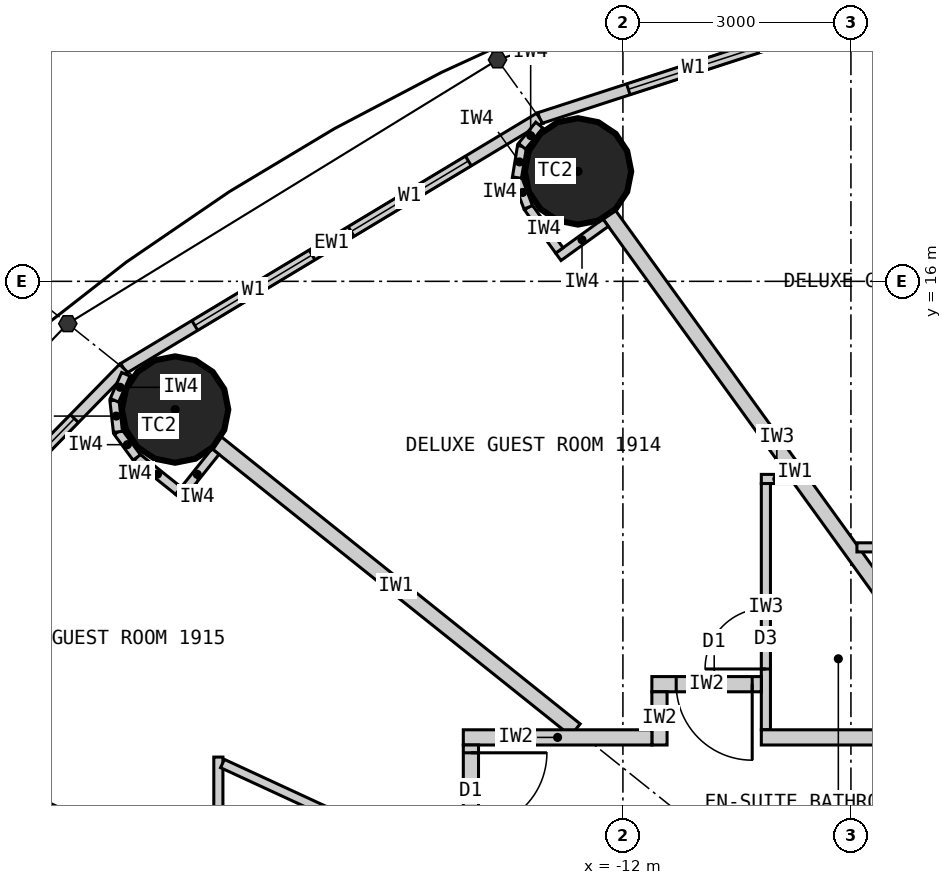
"""IFC4 building model, lengths in metres.
Left out: names, types, materials, properties, quantities, classifications, styles, units other than length and angle.
Written with IfcOpenShell. Run it as: python <this file> out.ifc"""

import sys

from ifc_helpers import new_model, si_unit, direction, frame, frame_2d, origin, origin_2d, place, context, subcontext, project, spatial, rectangle, circle, extrude, element, fill, save


model = new_model("IFC4")
c1 = context("Model", 3, precision=1e-05, world=origin(), true_north=direction((0.0, 1.0)))
c2 = subcontext(c1, "Body", "Model", "MODEL_VIEW")
j1 = project(units=[si_unit("LENGTHUNIT", "METRE"), si_unit("PLANEANGLEUNIT", "RADIAN")], contexts=[c1])
p1 = place(None, origin())
s1 = spatial("IfcSite", under=j1, at=p1, CompositionType="ELEMENT")
p2 = place(p1, origin())
s2 = spatial("IfcBuilding", under=s1, at=p2, CompositionType="ELEMENT")
p3 = place(p2, frame((0.0, 0.0, 77.1)))
s3 = spatial("IfcBuildingStorey", under=s2, at=p3, CompositionType="ELEMENT", Elevation=77.1)
for number, where, z_axis, x_axis in (
    (1, (-12.591, 17.447, 0.0), (0.0, 0.0, 1.0), (1.0, 0.0, 0.0)),
    (2, (-17.892, 14.313, 0.0), (0.0, 0.0, 1.0), (1.0, 0.0, 0.0)),
):
    element("IfcColumn", number, at=place(p3, frame(where, z_axis=z_axis, x_axis=x_axis)), inside=s3, PredefinedType="COLUMN", context=c2, shape_type="SweptSolid", body=[
        extrude(circle(Radius=0.7, at=origin_2d()), origin(), (0.0, 0.0, 1.0), 3.3),
    ])
p4 = place(p3, frame((-6.766, 20.202, 0.0), z_axis=(0.0, 0.0, 1.0), x_axis=(-0.951137534625, -0.308767534285, 0.0)))
e3 = element("IfcWall", 3, at=p4, inside=s3, PredefinedType="ELEMENTEDWALL", context=c2, shape_type="SweptSolid", body=[
    extrude(rectangle(XDim=6.655, YDim=0.15, at=frame_2d((3.328, 0.0))), origin(), (0.0, 0.0, 1.0), 3.12),
])
p5 = place(p4, frame((1.228, 0.0, 0.9)))
e4 = element("IfcOpeningElement", 4, at=p5, cuts=e3, PredefinedType="OPENING", context=c2, shape_type="SweptSolid", body=[
    extrude(rectangle(XDim=1.8, YDim=1.9, at=frame_2d((0.9, 0.95))), frame((0.0, 0.085, 0.0), z_axis=(0.0, -1.0, 0.0), x_axis=(1.0, 0.0, 0.0)), (0.0, 0.0, 1.0), 0.17),
])
p6 = place(p4, frame((3.628, 0.0, 0.9)))
e5 = element("IfcOpeningElement", 5, at=p6, cuts=e3, PredefinedType="OPENING", context=c2, shape_type="SweptSolid", body=[
    extrude(rectangle(XDim=1.8, YDim=1.9, at=frame_2d((0.9, 0.95))), frame((0.0, 0.085, 0.0), z_axis=(0.0, -1.0, 0.0), x_axis=(1.0, 0.0, 0.0)), (0.0, 0.0, 1.0), 0.17),
])
p7 = place(p3, frame((-13.096, 18.147, 0.0), z_axis=(0.0, 0.0, 1.0), x_axis=(-0.856983180864, -0.515344377787, 0.0)))
e6 = element("IfcWall", 6, at=p7, inside=s3, PredefinedType="ELEMENTEDWALL", context=c2, shape_type="SweptSolid", body=[
    extrude(rectangle(XDim=6.386, YDim=0.15, at=frame_2d((3.193, 0.0))), origin(), (0.0, 0.0, 1.0), 3.12),
])
p8 = place(p7, frame((1.093, 0.0, 0.9)))
e7 = element("IfcOpeningElement", 7, at=p8, cuts=e6, PredefinedType="OPENING", context=c2, shape_type="SweptSolid", body=[
    extrude(rectangle(XDim=1.8, YDim=1.9, at=frame_2d((0.9, 0.95))), frame((0.0, 0.085, 0.0), z_axis=(0.0, -1.0, 0.0), x_axis=(1.0, 0.0, 0.0)), (0.0, 0.0, 1.0), 0.17),
])
p9 = place(p7, frame((3.493, 0.0, 0.9)))
e8 = element("IfcOpeningElement", 8, at=p9, cuts=e6, PredefinedType="OPENING", context=c2, shape_type="SweptSolid", body=[
    extrude(rectangle(XDim=1.8, YDim=1.9, at=frame_2d((0.9, 0.95))), frame((0.0, 0.085, 0.0), z_axis=(0.0, -1.0, 0.0), x_axis=(1.0, 0.0, 0.0)), (0.0, 0.0, 1.0), 0.17),
])
p10 = place(p3, frame((-18.57, 14.856, 0.0), z_axis=(0.0, 0.0, 1.0), x_axis=(-0.699602905915, -0.714531856557, 0.0)))
e9 = element("IfcWall", 9, at=p10, inside=s3, PredefinedType="ELEMENTEDWALL", context=c2, shape_type="SweptSolid", body=[
    extrude(rectangle(XDim=6.051, YDim=0.15, at=frame_2d((3.025, 0.0))), origin(), (0.0, 0.0, 1.0), 3.12),
])
p11 = place(p10, frame((0.926, 0.0, 0.9)))
e10 = element("IfcOpeningElement", 10, at=p11, cuts=e9, PredefinedType="OPENING", context=c2, shape_type="SweptSolid", body=[
    extrude(rectangle(XDim=1.8, YDim=1.9, at=frame_2d((0.9, 0.95))), frame((0.0, 0.085, 0.0), z_axis=(0.0, -1.0, 0.0), x_axis=(1.0, 0.0, 0.0)), (0.0, 0.0, 1.0), 0.17),
])
p12 = place(p10, frame((3.325, 0.0, 0.9)))
e11 = element("IfcOpeningElement", 11, at=p12, cuts=e9, PredefinedType="OPENING", context=c2, shape_type="SweptSolid", body=[
    extrude(rectangle(XDim=1.8, YDim=1.9, at=frame_2d((0.9, 0.95))), frame((0.0, 0.085, 0.0), z_axis=(0.0, -1.0, 0.0), x_axis=(1.0, 0.0, 0.0)), (0.0, 0.0, 1.0), 0.17),
])
p13 = place(p3, frame((-7.289, 10.1, 0.0), z_axis=(0.0, 0.0, 1.0), x_axis=(-0.585198353053, 0.810890182197, 0.0)))
e12 = element("IfcWall", 12, at=p13, inside=s3, PredefinedType="PARTITIONING", context=c2, shape_type="SweptSolid", body=[
    extrude(rectangle(XDim=8.36, YDim=0.2, at=frame_2d((4.18, 0.0))), origin(), (0.0, 0.0, 1.0), 2.32),
])
p14 = place(p3, frame((-12.625, 10.1, 0.0), z_axis=(0.0, 0.0, 1.0), x_axis=(-0.780892451574, 0.624665493744, 0.0)))
e13 = element("IfcWall", 13, at=p14, inside=s3, PredefinedType="PARTITIONING", context=c2, shape_type="SweptSolid", body=[
    extrude(rectangle(XDim=6.045, YDim=0.2, at=frame_2d((3.022, 0.0))), origin(), (0.0, 0.0, 1.0), 2.32),
])
p15 = place(p3, frame((-14.1, 6.512, 0.0), z_axis=(0.0, 0.0, 1.0), x_axis=(-0.907832871056, 0.419332181247, 0.0)))
e14 = element("IfcWall", 14, at=p15, inside=s3, PredefinedType="PARTITIONING", context=c2, shape_type="SweptSolid", body=[
    extrude(rectangle(XDim=8.023, YDim=0.2, at=frame_2d((4.011, 0.0))), origin(), (0.0, 0.0, 1.0), 2.32),
])
p16 = place(p3, frame((-8.921, 12.5, 0.0), z_axis=(0.0, 0.0, 1.0), x_axis=(1.0, 0.0, 0.0)))
e15 = element("IfcWall", 15, at=p16, inside=s3, PredefinedType="PARTITIONING", context=c2, shape_type="SweptSolid", body=[
    extrude(rectangle(XDim=3.372, YDim=0.12, at=frame_2d((1.686, 0.0))), origin(), (0.0, 0.0, 1.0), 3.12),
])
p17 = place(p3, frame((-9.771, 13.4, 0.0), z_axis=(0.0, 0.0, 1.0), x_axis=(-1.0, 0.0, 0.0)))
e16 = element("IfcWall", 16, at=p17, inside=s3, PredefinedType="PARTITIONING", context=c2, shape_type="SweptSolid", body=[
    extrude(rectangle(XDim=0.408, YDim=0.12, at=frame_2d((0.204, 0.0))), origin(), (0.0, 0.0, 1.0), 3.12),
])
p18 = place(p3, frame((-10.119, 10.1, 0.0), z_axis=(0.0, 0.0, 1.0), x_axis=(0.0, 1.0, 0.0)))
e17 = element("IfcWall", 17, at=p18, inside=s3, PredefinedType="PARTITIONING", context=c2, shape_type="SweptSolid", body=[
    extrude(rectangle(XDim=3.24, YDim=0.12, at=frame_2d((1.62, 0.0))), origin(), (0.0, 0.0, 1.0), 3.12),
])
p19 = place(p18, frame((0.8, 0.0, 0.0)))
e18 = element("IfcOpeningElement", 18, at=p19, cuts=e17, PredefinedType="OPENING", context=c2, shape_type="SweptSolid", body=[
    extrude(rectangle(XDim=0.8, YDim=2.1, at=frame_2d((0.4, 1.05))), frame((0.0, 0.07, 0.0), z_axis=(0.0, -1.0, 0.0), x_axis=(1.0, 0.0, 0.0)), (0.0, 0.0, 1.0), 0.14),
])
p20 = place(p3, frame((-17.323, 8.101, 0.0), z_axis=(0.0, 0.0, 1.0), x_axis=(0.0, 1.0, 0.0)))
e19 = element("IfcWall", 19, at=p20, inside=s3, PredefinedType="PARTITIONING", context=c2, shape_type="SweptSolid", body=[
    extrude(rectangle(XDim=1.64, YDim=0.12, at=frame_2d((0.82, 0.0))), origin(), (0.0, 0.0, 1.0), 3.12),
])
p21 = place(p3, frame((-14.1, 8.193, 0.0), z_axis=(0.0, 0.0, 1.0), x_axis=(-0.907836493557, 0.419324338628, 0.0)))
e20 = element("IfcWall", 20, at=p21, inside=s3, PredefinedType="PARTITIONING", context=c2, shape_type="SweptSolid", body=[
    extrude(rectangle(XDim=3.49, YDim=0.12, at=frame_2d((1.745, 0.0))), origin(), (0.0, 0.0, 1.0), 3.12),
])
p22 = place(p21, frame((0.75, 0.0, 0.0)))
e21 = element("IfcOpeningElement", 21, at=p22, cuts=e20, PredefinedType="OPENING", context=c2, shape_type="SweptSolid", body=[
    extrude(rectangle(XDim=0.8, YDim=2.1, at=frame_2d((0.4, 1.05))), frame((0.0, 0.07, 0.0), z_axis=(0.0, -1.0, 0.0), x_axis=(1.0, 0.0, 0.0)), (0.0, 0.0, 1.0), 0.14),
])
p23 = place(p3, frame((-11.619, 10.7, 0.0), z_axis=(0.0, 0.0, 1.0), x_axis=(1.0, 0.0, 0.0)))
e22 = element("IfcWall", 22, at=p23, inside=s3, PredefinedType="PARTITIONING", context=c2, shape_type="SweptSolid", body=[
    extrude(rectangle(XDim=1.44, YDim=0.2, at=frame_2d((0.72, 0.0))), origin(), (0.0, 0.0, 1.0), 3.12),
])
p24 = place(p23, frame((0.32, 0.0, 0.0)))
e23 = element("IfcOpeningElement", 23, at=p24, cuts=e22, PredefinedType="OPENING", context=c2, shape_type="SweptSolid", body=[
    extrude(rectangle(XDim=1.0, YDim=2.2, at=frame_2d((0.5, 1.1))), frame((0.0, 0.11, 0.0), z_axis=(0.0, -1.0, 0.0), x_axis=(1.0, 0.0, 0.0)), (0.0, 0.0, 1.0), 0.22),
])
p25 = place(p3, frame((-11.519, 9.9, 0.0), z_axis=(0.0, 0.0, 1.0), x_axis=(0.0, 1.0, 0.0)))
e24 = element("IfcWall", 24, at=p25, inside=s3, PredefinedType="PARTITIONING", context=c2, shape_type="SweptSolid", body=[
    extrude(rectangle(XDim=0.7, YDim=0.2, at=frame_2d((0.35, 0.0))), origin(), (0.0, 0.0, 1.0), 3.12),
])
p26 = place(p3, frame((-14.1, 10.0, 0.0), z_axis=(0.0, 0.0, 1.0), x_axis=(1.0, 0.0, 0.0)))
e25 = element("IfcWall", 25, at=p26, inside=s3, PredefinedType="PARTITIONING", context=c2, shape_type="SweptSolid", body=[
    extrude(rectangle(XDim=2.481, YDim=0.2, at=frame_2d((1.24, 0.0))), origin(), (0.0, 0.0, 1.0), 3.12),
])
p27 = place(p3, frame((-10.179, 10.0, 0.0), z_axis=(0.0, 0.0, 1.0), x_axis=(1.0, 0.0, 0.0)))
e26 = element("IfcWall", 26, at=p27, inside=s3, PredefinedType="PARTITIONING", context=c2, shape_type="SweptSolid", body=[
    extrude(rectangle(XDim=4.63, YDim=0.2, at=frame_2d((2.315, 0.0))), origin(), (0.0, 0.0, 1.0), 3.12),
])
p28 = place(p3, frame((-14.0, 9.9, 0.0), z_axis=(0.0, 0.0, 1.0), x_axis=(0.0, -1.0, 0.0)))
e27 = element("IfcWall", 27, at=p28, inside=s3, PredefinedType="PARTITIONING", context=c2, shape_type="SweptSolid", body=[
    extrude(rectangle(XDim=5.127, YDim=0.2, at=frame_2d((2.564, 0.0))), origin(), (0.0, 0.0, 1.0), 3.12),
])
p29 = place(p28, frame((0.103, 0.0, 0.0)))
e28 = element("IfcOpeningElement", 28, at=p29, cuts=e27, PredefinedType="OPENING", context=c2, shape_type="SweptSolid", body=[
    extrude(rectangle(XDim=1.0, YDim=2.2, at=frame_2d((0.5, 1.1))), frame((0.0, 0.11, 0.0), z_axis=(0.0, -1.0, 0.0), x_axis=(1.0, 0.0, 0.0)), (0.0, 0.0, 1.0), 0.22),
])
p30 = place(p3, frame((-12.227, 16.772, 0.0), z_axis=(0.0, 0.0, 1.0), x_axis=(-0.810821798253, -0.585293098778, 0.0)))
e29 = element("IfcWall", 29, at=p30, inside=s3, PredefinedType="PARTITIONING", context=c2, shape_type="SweptSolid", body=[
    extrude(rectangle(XDim=0.768, YDim=0.12, at=frame_2d((0.384, 0.0))), origin(), (0.0, 0.0, 1.0), 3.12),
])
p31 = place(p3, frame((-12.836, 16.406, 0.0), z_axis=(0.0, 0.0, 1.0), x_axis=(-0.585223113993, 0.810872312296, 0.0)))
e30 = element("IfcWall", 30, at=p31, inside=s3, PredefinedType="PARTITIONING", context=c2, shape_type="SweptSolid", body=[
    extrude(rectangle(XDim=0.7, YDim=0.12, at=frame_2d((0.35, 0.0))), origin(), (0.0, 0.0, 1.0), 3.12),
])
p32 = place(p3, frame((-13.246, 16.974, 0.0), z_axis=(0.0, 0.0, 1.0), x_axis=(-0.355728122235, 0.934589483705, 0.0)))
e31 = element("IfcWall", 31, at=p32, inside=s3, PredefinedType="PARTITIONING", context=c2, shape_type="SweptSolid", body=[
    extrude(rectangle(XDim=0.418, YDim=0.12, at=frame_2d((0.209, 0.0))), origin(), (0.0, 0.0, 1.0), 3.12),
])
p33 = place(p3, frame((-13.394, 17.365, 0.0), z_axis=(0.0, 0.0, 1.0), x_axis=(0.159379276926, 0.987217425943, 0.0)))
e32 = element("IfcWall", 32, at=p33, inside=s3, PredefinedType="PARTITIONING", context=c2, shape_type="SweptSolid", body=[
    extrude(rectangle(XDim=0.418, YDim=0.12, at=frame_2d((0.209, 0.0))), origin(), (0.0, 0.0, 1.0), 3.12),
])
p34 = place(p3, frame((-13.328, 17.777, 0.0), z_axis=(0.0, 0.0, 1.0), x_axis=(0.632276783541, 0.774742582407, 0.0)))
e33 = element("IfcWall", 33, at=p34, inside=s3, PredefinedType="PARTITIONING", context=c2, shape_type="SweptSolid", body=[
    extrude(rectangle(XDim=0.36, YDim=0.12, at=frame_2d((0.18, 0.0))), origin(), (0.0, 0.0, 1.0), 3.12),
])
p35 = place(p3, frame((-17.361, 13.76, 0.0), z_axis=(0.0, 0.0, 1.0), x_axis=(-0.624501042889, -0.781023973659, 0.0)))
e34 = element("IfcWall", 34, at=p35, inside=s3, PredefinedType="PARTITIONING", context=c2, shape_type="SweptSolid", body=[
    extrude(rectangle(XDim=0.767, YDim=0.12, at=frame_2d((0.384, 0.0))), origin(), (0.0, 0.0, 1.0), 3.12),
])
p36 = place(p3, frame((-17.85, 13.246, 0.0), z_axis=(0.0, 0.0, 1.0), x_axis=(-0.780902834923, 0.62465251333, 0.0)))
e35 = element("IfcWall", 35, at=p36, inside=s3, PredefinedType="PARTITIONING", context=c2, shape_type="SweptSolid", body=[
    extrude(rectangle(XDim=0.7, YDim=0.12, at=frame_2d((0.35, 0.0))), origin(), (0.0, 0.0, 1.0), 3.12),
])
for number, where, z_axis, x_axis in (
    (36, (-18.396, 13.683, 0.0), (0.0, 0.0, 1.0), (-0.592, 0.806, 0.0)),
    (37, (-18.644, 14.02, 0.0), (0.0, 0.0, 1.0), (-0.11, 0.994, 0.0)),
):
    element("IfcWall", number, at=place(p3, frame(where, z_axis=z_axis, x_axis=x_axis)), inside=s3, PredefinedType="PARTITIONING", context=c2, shape_type="SweptSolid", body=[
        extrude(rectangle(XDim=0.418, YDim=0.12, at=frame_2d((0.209, 0.0))), origin(), (0.0, 0.0, 1.0), 3.12),
    ])
p37 = place(p3, frame((-18.69, 14.435, 0.0), z_axis=(0.0, 0.0, 1.0), x_axis=(0.401093412634, 0.91603715773, 0.0)))
e38 = element("IfcWall", 38, at=p37, inside=s3, PredefinedType="PARTITIONING", context=c2, shape_type="SweptSolid", body=[
    extrude(rectangle(XDim=0.373, YDim=0.12, at=frame_2d((0.187, 0.0))), origin(), (0.0, 0.0, 1.0), 3.12),
])
p38 = place(p6, origin())
e39 = element("IfcWindow", 39, at=p38, inside=s3, PartitioningType="SINGLE_PANEL", PredefinedType="WINDOW", context=c2, shape_type="SweptSolid", body=[
    extrude(rectangle(XDim=1.8, YDim=1.9, at=frame_2d((0.9, 0.95))), frame((0.0, 0.03, 0.0), z_axis=(0.0, -1.0, 0.0), x_axis=(1.0, 0.0, 0.0)), (0.0, 0.0, 1.0), 0.06),
])
fill(e5, e39)
p39 = place(p8, origin())
e40 = element("IfcWindow", 40, at=p39, inside=s3, PartitioningType="SINGLE_PANEL", PredefinedType="WINDOW", context=c2, shape_type="SweptSolid", body=[
    extrude(rectangle(XDim=1.8, YDim=1.9, at=frame_2d((0.9, 0.95))), frame((0.0, 0.03, 0.0), z_axis=(0.0, -1.0, 0.0), x_axis=(1.0, 0.0, 0.0)), (0.0, 0.0, 1.0), 0.06),
])
fill(e7, e40)
p40 = place(p9, origin())
e41 = element("IfcWindow", 41, at=p40, inside=s3, PartitioningType="SINGLE_PANEL", PredefinedType="WINDOW", context=c2, shape_type="SweptSolid", body=[
    extrude(rectangle(XDim=1.8, YDim=1.9, at=frame_2d((0.9, 0.95))), frame((0.0, 0.03, 0.0), z_axis=(0.0, -1.0, 0.0), x_axis=(1.0, 0.0, 0.0)), (0.0, 0.0, 1.0), 0.06),
])
fill(e8, e41)
p41 = place(p11, origin())
e42 = element("IfcWindow", 42, at=p41, inside=s3, PartitioningType="SINGLE_PANEL", PredefinedType="WINDOW", context=c2, shape_type="SweptSolid", body=[
    extrude(rectangle(XDim=1.8, YDim=1.9, at=frame_2d((0.9, 0.95))), frame((0.0, 0.03, 0.0), z_axis=(0.0, -1.0, 0.0), x_axis=(1.0, 0.0, 0.0)), (0.0, 0.0, 1.0), 0.06),
])
fill(e10, e42)
p42 = place(p19, origin())
e43 = element("IfcDoor", 43, at=p42, inside=s3, OperationType="SINGLE_SWING_LEFT", PredefinedType="DOOR", context=c2, shape_type="SweptSolid", body=[
    extrude(rectangle(XDim=0.8, YDim=2.1, at=frame_2d((0.4, 1.05))), frame((0.0, 0.025, 0.0), z_axis=(0.0, -1.0, 0.0), x_axis=(1.0, 0.0, 0.0)), (0.0, 0.0, 1.0), 0.05),
])
fill(e18, e43)
p43 = place(p24, origin())
e44 = element("IfcDoor", 44, at=p43, inside=s3, OperationType="SINGLE_SWING_RIGHT", PredefinedType="DOOR", context=c2, shape_type="SweptSolid", body=[
    extrude(rectangle(XDim=1.0, YDim=2.2, at=frame_2d((0.5, 1.1))), frame((0.0, 0.025, 0.0), z_axis=(0.0, -1.0, 0.0), x_axis=(1.0, 0.0, 0.0)), (0.0, 0.0, 1.0), 0.05),
])
fill(e23, e44)
p44 = place(p29, origin())
e45 = element("IfcDoor", 45, at=p44, inside=s3, OperationType="SINGLE_SWING_LEFT", PredefinedType="DOOR", context=c2, shape_type="SweptSolid", body=[
    extrude(rectangle(XDim=1.0, YDim=2.2, at=frame_2d((0.5, 1.1))), frame((0.0, 0.025, 0.0), z_axis=(0.0, -1.0, 0.0), x_axis=(1.0, 0.0, 0.0)), (0.0, 0.0, 1.0), 0.05),
])
fill(e28, e45)
save(model, sys.argv[1])
